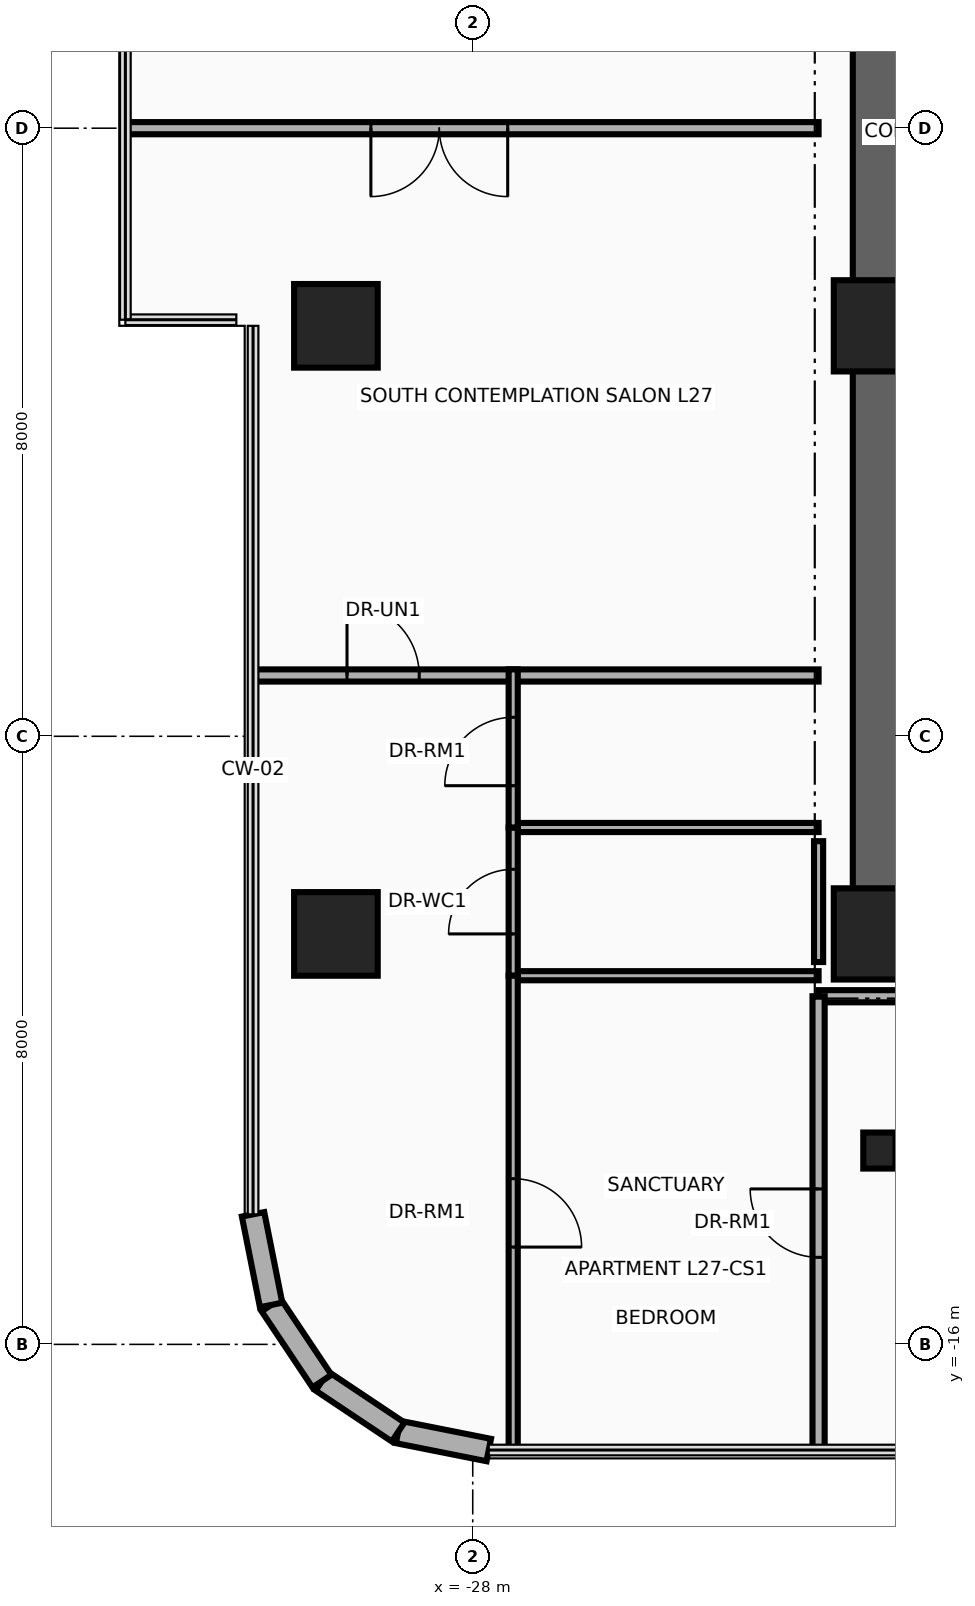
"""IFC4 building model, lengths in metres.
Left out: names, types, materials, properties, quantities, classifications, styles, units other than length and angle.
Written with IfcOpenShell. Run it as: python <this file> out.ifc"""

import sys

from ifc_helpers import new_model, si_unit, direction, frame, frame_2d, origin, origin_2d, place, context, subcontext, project, spatial, rectangle, circle, i_section, extrude, source, transform, mapped, element, fill, save


model = new_model("IFC4")
c1 = context("Model", 3, precision=1e-05, world=origin(), true_north=direction((0.0, 1.0)))
c2 = subcontext(c1, "Body", "Model", "MODEL_VIEW")
j1 = project(units=[si_unit("LENGTHUNIT", "METRE"), si_unit("PLANEANGLEUNIT", "RADIAN")], contexts=[c1])
p1 = place(None, origin())
s1 = spatial("IfcSite", under=j1, at=p1, CompositionType="ELEMENT")
p2 = place(p1, origin())
s2 = spatial("IfcBuilding", under=s1, at=p2, CompositionType="ELEMENT")
p3 = place(p2, frame((0.0, 0.0, 109.4)))
s3 = spatial("IfcBuildingStorey", under=s2, at=p3, CompositionType="ELEMENT", Elevation=109.4)
p4 = place(p3, frame((-22.65, -11.15, 0.0), z_axis=(0.0, 0.0, 1.0), x_axis=(0.0, 1.0, 0.0)))
e1 = element("IfcWall", 1, at=p4, inside=s3, PredefinedType="SHEAR", context=c2, shape_type="SweptSolid", body=[
    extrude(rectangle(XDim=22.3, YDim=0.7, at=frame_2d((11.15, 0.0))), origin(), (0.0, 0.0, 1.0), 3.46),
])
p5 = place(p3, frame((-22.65, -10.8, 0.0), z_axis=(0.0, 0.0, 1.0), x_axis=(1.0, 0.0, 0.0)))
e2 = element("IfcWall", 2, at=p5, inside=s3, PredefinedType="SHEAR", context=c2, shape_type="SweptSolid", body=[
    extrude(rectangle(XDim=10.25, YDim=0.7, at=frame_2d((5.125, 0.0))), origin(), (0.0, 0.0, 1.0), 3.46),
])
m1 = source(origin(), c2, "Body", "SweptSolid", [
    extrude(circle(Radius=0.55, at=origin_2d()), origin(), (0.0, 0.0, 1.0), 3.7),
])
p6 = place(p3, frame((-29.8, -10.6, 0.0), z_axis=(0.0, 0.0, 1.0), x_axis=(1.0, 0.0, 0.0)))
e3 = element("IfcColumn", 3, at=p6, inside=s3, PredefinedType="COLUMN", context=c2, shape_type="MappedRepresentation", body=[
    mapped(m1, transform((0.0, 0.0, 0.0), x_axis=(1.0, 0.0, 0.0), y_axis=(0.0, 1.0, 0.0), z_axis=(0.0, 0.0, 1.0), scale=1.0)),
])
m2 = source(origin(), c2, "Body", "SweptSolid", [
    extrude(rectangle(XDim=1.2, YDim=1.2, at=origin_2d()), origin(), (0.0, 0.0, 1.0), 3.7),
])
p7 = place(p3, frame((-22.65, -10.6, 0.0), z_axis=(0.0, 0.0, 1.0), x_axis=(1.0, 0.0, 0.0)))
e4 = element("IfcColumn", 4, at=p7, inside=s3, PredefinedType="COLUMN", context=c2, shape_type="MappedRepresentation", body=[
    mapped(m2, transform((0.0, 0.0, 0.0), x_axis=(1.0, 0.0, 0.0), y_axis=(0.0, 1.0, 0.0), z_axis=(0.0, 0.0, 1.0), scale=1.0)),
])
p8 = place(p3, frame((-29.8, -2.6, 0.0), z_axis=(0.0, 0.0, 1.0), x_axis=(1.0, 0.0, 0.0)))
e5 = element("IfcColumn", 5, at=p8, inside=s3, PredefinedType="COLUMN", context=c2, shape_type="MappedRepresentation", body=[
    mapped(m1, transform((0.0, 0.0, 0.0), x_axis=(1.0, 0.0, 0.0), y_axis=(0.0, 1.0, 0.0), z_axis=(0.0, 0.0, 1.0), scale=1.0)),
])
p9 = place(p3, frame((-22.65, -2.6, 0.0), z_axis=(0.0, 0.0, 1.0), x_axis=(1.0, 0.0, 0.0)))
e6 = element("IfcColumn", 6, at=p9, inside=s3, PredefinedType="COLUMN", context=c2, shape_type="MappedRepresentation", body=[
    mapped(m2, transform((0.0, 0.0, 0.0), x_axis=(1.0, 0.0, 0.0), y_axis=(0.0, 1.0, 0.0), z_axis=(0.0, 0.0, 1.0), scale=1.0)),
])
m3 = source(origin(), c2, "Body", "SweptSolid", [
    extrude(i_section(OverallWidth=0.424, OverallDepth=0.474, WebThickness=0.048, FlangeThickness=0.077, at=origin_2d()), origin(), (0.0, 0.0, 1.0), 3.7),
])
p10 = place(p3, frame((-22.65, -13.45, 0.0), z_axis=(0.0, 0.0, 1.0), x_axis=(1.0, 0.0, 0.0)))
e7 = element("IfcColumn", 7, at=p10, inside=s3, PredefinedType="COLUMN", context=c2, shape_type="MappedRepresentation", body=[
    mapped(m3, transform((0.0, 0.0, 0.0), x_axis=(1.0, 0.0, 0.0), y_axis=(0.0, 1.0, 0.0), z_axis=(0.0, 0.0, 1.0), scale=1.0)),
])
p11 = place(p3, frame((-27.789, -17.39, 0.0), z_axis=(0.0, 0.0, 1.0), x_axis=(-0.980804027463, 0.194996050505, 0.0)))
e8 = element("IfcWall", 8, at=p11, inside=s3, PredefinedType="SOLIDWALL", context=c2, shape_type="SweptSolid", body=[
    extrude(rectangle(XDim=1.216, YDim=0.3, at=frame_2d((0.608, 0.0))), origin(), (0.0, 0.0, 1.0), 3.46),
])
for number, where, z_axis, x_axis in (
    (9, (-28.982, -17.153, 0.0), (0.0, 0.0, 1.0), (-0.831, 0.556, 0.0)),
    (10, (-29.983, -16.483, 0.0), (0.0, 0.0, 1.0), (-0.556, 0.831, 0.0)),
):
    element("IfcWall", number, at=place(p3, frame(where, z_axis=z_axis, x_axis=x_axis)), inside=s3, PredefinedType="SOLIDWALL", context=c2, shape_type="SweptSolid", body=[
        extrude(rectangle(XDim=1.205, YDim=0.3, at=frame_2d((0.603, 0.0))), origin(), (0.0, 0.0, 1.0), 3.46),
    ])
p12 = place(p3, frame((-30.653, -15.482, 0.0), z_axis=(0.0, 0.0, 1.0), x_axis=(-0.194996050505, 0.980804027463, 0.0)))
e11 = element("IfcWall", 11, at=p12, inside=s3, PredefinedType="SOLIDWALL", context=c2, shape_type="SweptSolid", body=[
    extrude(rectangle(XDim=1.216, YDim=0.3, at=frame_2d((0.608, 0.0))), origin(), (0.0, 0.0, 1.0), 3.46),
])
p13 = place(p3, frame((-23.45, -11.42, 0.0), z_axis=(0.0, 0.0, 1.0), x_axis=(1.0, 0.0, 0.0)))
e12 = element("IfcWall", 12, at=p13, inside=s3, PredefinedType="PARTITIONING", context=c2, shape_type="SweptSolid", body=[
    extrude(rectangle(XDim=13.84, YDim=0.16, at=frame_2d((6.92, 0.0))), origin(), (0.0, 0.0, 1.0), 2.834),
])
p14 = place(p3, frame((-23.45, -17.39, 0.0), z_axis=(0.0, 0.0, 1.0), x_axis=(0.0, 1.0, 0.0)))
e13 = element("IfcWall", 13, at=p14, inside=s3, PredefinedType="PARTITIONING", context=c2, shape_type="SweptSolid", body=[
    extrude(rectangle(XDim=5.97, YDim=0.16, at=frame_2d((2.985, 0.0))), origin(), (0.0, 0.0, 1.0), 3.46),
])
p15 = place(p14, frame((2.535, 0.0, 0.0)))
e14 = element("IfcOpeningElement", 14, at=p15, cuts=e13, PredefinedType="OPENING", context=c2, shape_type="SweptSolid", body=[
    extrude(rectangle(XDim=0.9, YDim=2.1, at=frame_2d((0.45, 1.05))), frame((0.0, 0.095, 0.0), z_axis=(0.0, -1.0, 0.0), x_axis=(1.0, 0.0, 0.0)), (0.0, 0.0, 1.0), 0.19),
])
p16 = place(p3, frame((-30.89, -7.2, 0.0), z_axis=(0.0, 0.0, 1.0), x_axis=(1.0, 0.0, 0.0)))
e15 = element("IfcWall", 15, at=p16, inside=s3, PredefinedType="PARTITIONING", context=c2, shape_type="SweptSolid", body=[
    extrude(rectangle(XDim=7.44, YDim=0.16, at=frame_2d((3.72, 0.0))), origin(), (0.0, 0.0, 1.0), 2.896),
])
p17 = place(p16, frame((1.236, 0.0, 0.0)))
e16 = element("IfcOpeningElement", 16, at=p17, cuts=e15, PredefinedType="OPENING", context=c2, shape_type="SweptSolid", body=[
    extrude(rectangle(XDim=0.95, YDim=2.15, at=frame_2d((0.475, 1.075))), frame((0.0, 0.095, 0.0), z_axis=(0.0, -1.0, 0.0), x_axis=(1.0, 0.0, 0.0)), (0.0, 0.0, 1.0), 0.19),
])
p18 = place(p3, frame((-27.468, -9.2, 0.0), z_axis=(0.0, 0.0, 1.0), x_axis=(1.0, 0.0, 0.0)))
e17 = element("IfcWall", 17, at=p18, inside=s3, PredefinedType="PARTITIONING", context=c2, shape_type="SweptSolid", body=[
    extrude(rectangle(XDim=4.018, YDim=0.12, at=frame_2d((2.009, 0.0))), origin(), (0.0, 0.0, 1.0), 2.988),
])
p19 = place(p3, frame((-27.468, -11.15, 0.0), z_axis=(0.0, 0.0, 1.0), x_axis=(1.0, 0.0, 0.0)))
e18 = element("IfcWall", 18, at=p19, inside=s3, PredefinedType="PARTITIONING", context=c2, shape_type="SweptSolid", body=[
    extrude(rectangle(XDim=4.018, YDim=0.12, at=frame_2d((2.009, 0.0))), origin(), (0.0, 0.0, 1.0), 3.46),
])
p20 = place(p3, frame((-27.468, -11.15, 0.0), z_axis=(0.0, 0.0, 1.0), x_axis=(0.0, 1.0, 0.0)))
e19 = element("IfcWall", 19, at=p20, inside=s3, PredefinedType="PARTITIONING", context=c2, shape_type="SweptSolid", body=[
    extrude(rectangle(XDim=1.95, YDim=0.12, at=frame_2d((0.975, 0.0))), origin(), (0.0, 0.0, 1.0), 2.666),
])
p21 = place(p20, frame((0.55, 0.0, 0.0)))
e20 = element("IfcOpeningElement", 20, at=p21, cuts=e19, PredefinedType="OPENING", context=c2, shape_type="SweptSolid", body=[
    extrude(rectangle(XDim=0.85, YDim=2.1, at=frame_2d((0.425, 1.05))), frame((0.0, 0.075, 0.0), z_axis=(0.0, -1.0, 0.0), x_axis=(1.0, 0.0, 0.0)), (0.0, 0.0, 1.0), 0.15),
])
p22 = place(p3, frame((-27.468, -9.2, 0.0), z_axis=(0.0, 0.0, 1.0), x_axis=(0.0, 1.0, 0.0)))
e21 = element("IfcWall", 21, at=p22, inside=s3, PredefinedType="PARTITIONING", context=c2, shape_type="SweptSolid", body=[
    extrude(rectangle(XDim=2.08, YDim=0.12, at=frame_2d((1.04, 0.0))), origin(), (0.0, 0.0, 1.0), 2.988),
])
p23 = place(p22, frame((0.55, 0.0, 0.0)))
e22 = element("IfcOpeningElement", 22, at=p23, cuts=e21, PredefinedType="OPENING", context=c2, shape_type="SweptSolid", body=[
    extrude(rectangle(XDim=0.9, YDim=2.1, at=frame_2d((0.45, 1.05))), frame((0.0, 0.075, 0.0), z_axis=(0.0, -1.0, 0.0), x_axis=(1.0, 0.0, 0.0)), (0.0, 0.0, 1.0), 0.15),
])
p24 = place(p3, frame((-27.468, -17.39, 0.0), z_axis=(0.0, 0.0, 1.0), x_axis=(0.0, 1.0, 0.0)))
e23 = element("IfcWall", 23, at=p24, inside=s3, PredefinedType="PARTITIONING", context=c2, shape_type="SweptSolid", body=[
    extrude(rectangle(XDim=6.24, YDim=0.12, at=frame_2d((3.12, 0.0))), origin(), (0.0, 0.0, 1.0), 3.46),
])
p25 = place(p24, frame((2.67, 0.0, 0.0)))
e24 = element("IfcOpeningElement", 24, at=p25, cuts=e23, PredefinedType="OPENING", context=c2, shape_type="SweptSolid", body=[
    extrude(rectangle(XDim=0.9, YDim=2.1, at=frame_2d((0.45, 1.05))), frame((0.0, 0.075, 0.0), z_axis=(0.0, -1.0, 0.0), x_axis=(1.0, 0.0, 0.0)), (0.0, 0.0, 1.0), 0.15),
])
p26 = place(p3, frame((-23.45, -10.97, 0.0), z_axis=(0.0, 0.0, 1.0), x_axis=(0.0, 1.0, 0.0)))
e25 = element("IfcWall", 25, at=p26, inside=s3, PredefinedType="PARTITIONING", context=c2, shape_type="SweptSolid", body=[
    extrude(rectangle(XDim=1.59, YDim=0.12, at=frame_2d((0.795, 0.0))), origin(), (0.0, 0.0, 1.0), 2.666),
])
p27 = place(p3, frame((-32.54, 0.0, 0.0), z_axis=(0.0, 0.0, 1.0), x_axis=(1.0, 0.0, 0.0)))
e26 = element("IfcWall", 26, at=p27, inside=s3, PredefinedType="PARTITIONING", context=c2, shape_type="SweptSolid", body=[
    extrude(rectangle(XDim=9.09, YDim=0.16, at=frame_2d((4.545, 0.0))), origin(), (0.0, 0.0, 1.0), 2.896),
])
p28 = place(p27, frame((3.2, 0.0, 0.0)))
e27 = element("IfcOpeningElement", 27, at=p28, cuts=e26, PredefinedType="OPENING", context=c2, shape_type="SweptSolid", body=[
    extrude(rectangle(XDim=1.8, YDim=2.15, at=frame_2d((0.9, 1.075))), frame((0.0, 0.095, 0.0), z_axis=(0.0, -1.0, 0.0), x_axis=(1.0, 0.0, 0.0)), (0.0, 0.0, 1.0), 0.19),
])
p29 = place(p17, origin())
e28 = element("IfcDoor", 28, at=p29, inside=s3, OperationType="SINGLE_SWING_RIGHT", PredefinedType="DOOR", context=c2, shape_type="SweptSolid", body=[
    extrude(rectangle(XDim=0.95, YDim=2.15, at=frame_2d((0.475, 1.075))), frame((0.0, 0.025, 0.0), z_axis=(0.0, -1.0, 0.0), x_axis=(1.0, 0.0, 0.0)), (0.0, 0.0, 1.0), 0.05),
])
fill(e16, e28)
p30 = place(p21, origin())
e29 = element("IfcDoor", 29, at=p30, inside=s3, OperationType="SINGLE_SWING_LEFT", PredefinedType="DOOR", context=c2, shape_type="SweptSolid", body=[
    extrude(rectangle(XDim=0.85, YDim=2.1, at=frame_2d((0.425, 1.05))), frame((0.0, 0.025, 0.0), z_axis=(0.0, -1.0, 0.0), x_axis=(1.0, 0.0, 0.0)), (0.0, 0.0, 1.0), 0.05),
])
fill(e20, e29)
p31 = place(p23, origin())
e30 = element("IfcDoor", 30, at=p31, inside=s3, OperationType="SINGLE_SWING_RIGHT", PredefinedType="DOOR", context=c2, shape_type="SweptSolid", body=[
    extrude(rectangle(XDim=0.9, YDim=2.1, at=frame_2d((0.45, 1.05))), frame((0.0, 0.025, 0.0), z_axis=(0.0, -1.0, 0.0), x_axis=(1.0, 0.0, 0.0)), (0.0, 0.0, 1.0), 0.05),
])
fill(e22, e30)
p32 = place(p25, frame((0.9, 0.0, 0.0), z_axis=(0.0, 0.0, 1.0), x_axis=(-1.0, 0.0, 0.0)))
e31 = element("IfcDoor", 31, at=p32, inside=s3, OperationType="SINGLE_SWING_LEFT", PredefinedType="DOOR", context=c2, shape_type="SweptSolid", body=[
    extrude(rectangle(XDim=0.9, YDim=2.1, at=frame_2d((0.45, 1.05))), frame((0.0, 0.025, 0.0), z_axis=(0.0, -1.0, 0.0), x_axis=(1.0, 0.0, 0.0)), (0.0, 0.0, 1.0), 0.05),
])
fill(e24, e31)
p33 = place(p28, frame((1.8, 0.0, 0.0), z_axis=(0.0, 0.0, 1.0), x_axis=(-1.0, 0.0, 0.0)))
e32 = element("IfcDoor", 32, at=p33, inside=s3, OperationType="DOUBLE_DOOR_SINGLE_SWING", PredefinedType="DOOR", context=c2, shape_type="SweptSolid", body=[
    extrude(rectangle(XDim=1.8, YDim=2.15, at=frame_2d((0.9, 1.075))), frame((0.0, 0.025, 0.0), z_axis=(0.0, -1.0, 0.0), x_axis=(1.0, 0.0, 0.0)), (0.0, 0.0, 1.0), 0.05),
])
fill(e27, e32)
p34 = place(p15, origin())
e33 = element("IfcDoor", 33, at=p34, inside=s3, OperationType="SINGLE_SWING_RIGHT", PredefinedType="DOOR", context=c2, shape_type="SweptSolid", body=[
    extrude(rectangle(XDim=0.9, YDim=2.1, at=frame_2d((0.45, 1.05))), frame((0.0, 0.025, 0.0), z_axis=(0.0, -1.0, 0.0), x_axis=(1.0, 0.0, 0.0)), (0.0, 0.0, 1.0), 0.05),
])
fill(e14, e33)
save(model, sys.argv[1])
